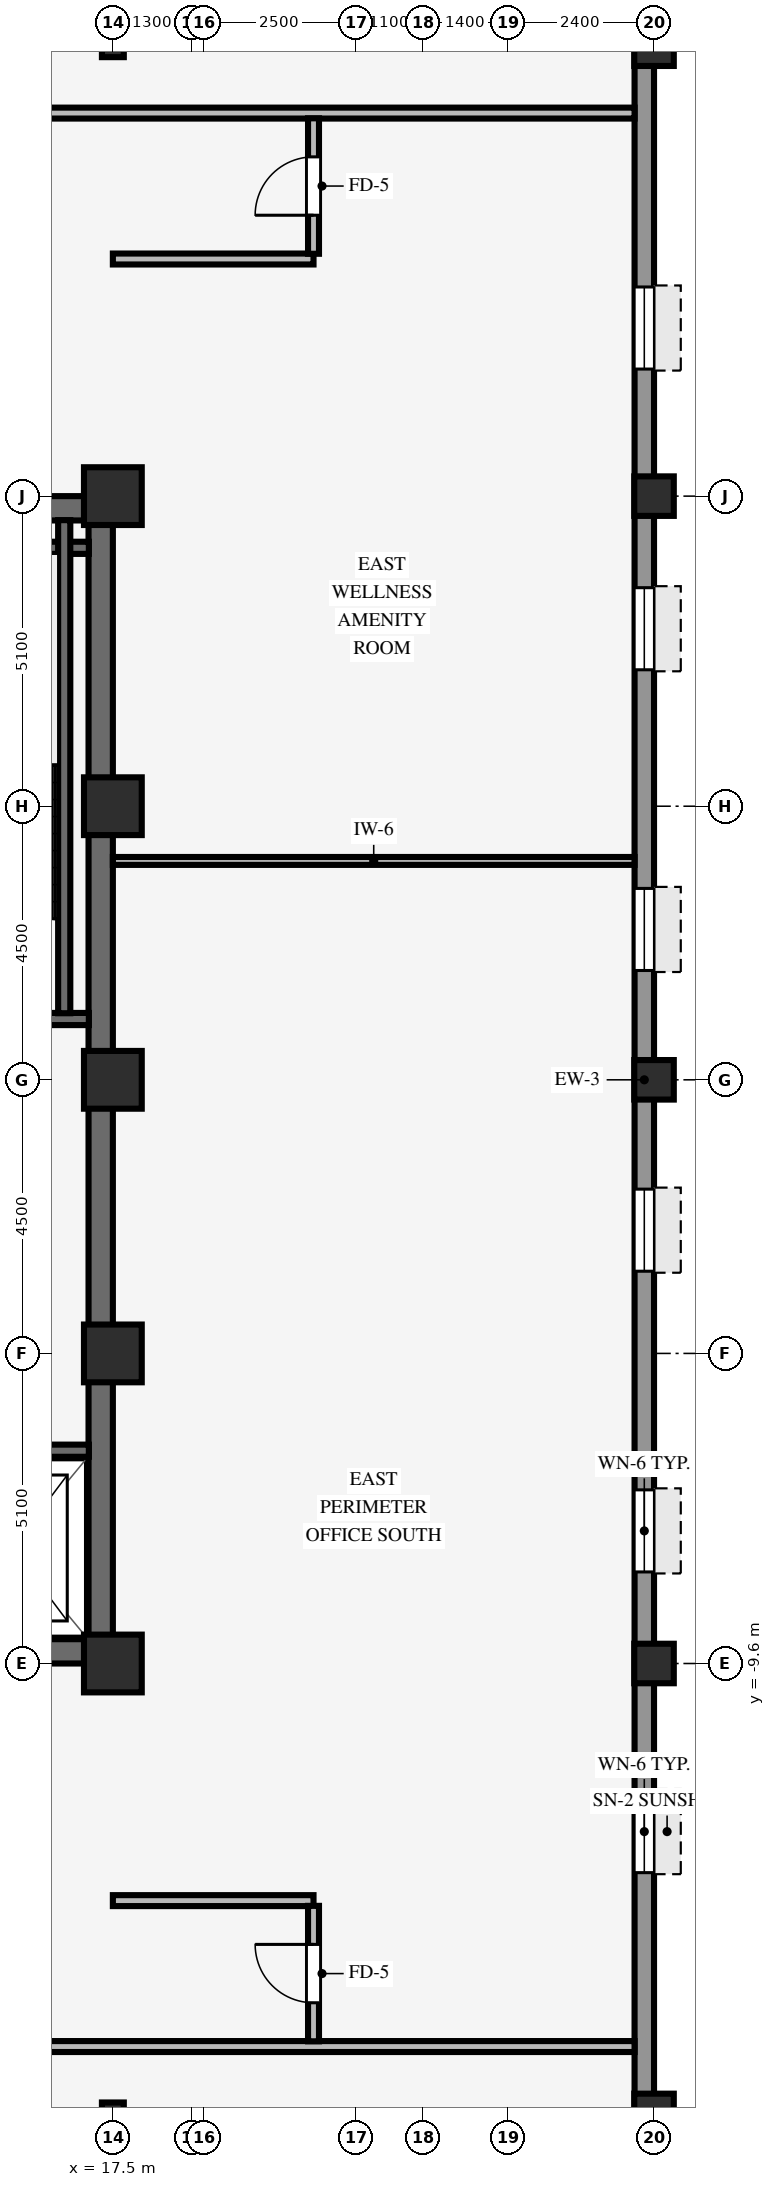
"""IFC4 building model, lengths in metres.
Left out: names, types, materials, properties, quantities, classifications, styles, units other than length and angle.
Written with IfcOpenShell. Run it as: python <this file> out.ifc"""

import sys

from ifc_helpers import new_model, si_unit, direction, frame, frame_2d, origin, origin_2d, place, context, subcontext, project, spatial, rectangle, hollow_rectangle, i_section, extrude, source, transform, mapped, element, fill, save


model = new_model("IFC4")
c1 = context("Model", 3, precision=1e-05, world=origin(), true_north=direction((0.0, 1.0)))
c2 = subcontext(c1, "Body", "Model", "MODEL_VIEW")
j1 = project(units=[si_unit("LENGTHUNIT", "METRE"), si_unit("PLANEANGLEUNIT", "RADIAN")], contexts=[c1])
p1 = place(None, origin())
s1 = spatial("IfcSite", under=j1, at=p1, CompositionType="ELEMENT")
p2 = place(p1, origin())
s2 = spatial("IfcBuilding", under=s1, at=p2, CompositionType="ELEMENT")
p3 = place(p2, frame((0.0, 0.0, 138.45)))
s3 = spatial("IfcBuildingStorey", under=s2, at=p3, CompositionType="ELEMENT", Elevation=138.45)
for number, where, z_axis, x_axis in (
    (1, (9.0, -9.4, 0.0), (0.0, 0.0, 1.0), (1.0, 0.0, 0.0)),
    (2, (9.0, 9.4, 0.0), (0.0, 0.0, 1.0), (1.0, 0.0, 0.0)),
):
    element("IfcWall", number, at=place(p3, frame(where, z_axis=z_axis, x_axis=x_axis)), inside=s3, PredefinedType="SHEAR", context=c2, shape_type="SweptSolid", body=[
        extrude(rectangle(XDim=8.5, YDim=0.4, at=frame_2d((4.25, 0.0))), origin(), (0.0, 0.0, 1.0), 3.37),
    ])
p4 = place(p3, frame((17.3, -9.205, 0.0), z_axis=(0.0, 0.0, 1.0), x_axis=(0.0, 1.0, 0.0)))
e3 = element("IfcWall", 3, at=p4, inside=s3, PredefinedType="SHEAR", context=c2, shape_type="SweptSolid", body=[
    extrude(rectangle(XDim=18.41, YDim=0.4, at=frame_2d((9.205, 0.0))), origin(), (0.0, 0.0, 1.0), 3.37),
])
for number, where, z_axis, x_axis in (
    (4, (17.5, -9.6, 0.0), (0.0, 0.0, 1.0), (1.0, 0.0, 0.0)),
    (5, (17.5, -4.5, 0.0), (0.0, 0.0, 1.0), (1.0, 0.0, 0.0)),
    (6, (17.5, 4.5, 0.0), (0.0, 0.0, 1.0), (1.0, 0.0, 0.0)),
    (7, (17.5, 9.6, 0.0), (0.0, 0.0, 1.0), (1.0, 0.0, 0.0)),
    (8, (17.5, 0.0, 0.0), (0.0, 0.0, 1.0), (1.0, 0.0, 0.0)),
):
    element("IfcColumn", number, at=place(p3, frame(where, z_axis=z_axis, x_axis=x_axis)), inside=s3, PredefinedType="COLUMN", context=c2, shape_type="SweptSolid", body=[
        extrude(rectangle(XDim=0.95, YDim=0.95, at=origin_2d()), origin(), (0.0, 0.0, 1.0), 3.37),
    ])
for number, where, z_axis, x_axis in (
    (9, (26.4, -17.0, 0.0), (0.0, 0.0, 1.0), (1.0, 0.0, 0.0)),
    (10, (26.4, -9.6, 0.0), (0.0, 0.0, 1.0), (1.0, 0.0, 0.0)),
    (11, (26.4, 0.0, 0.0), (0.0, 0.0, 1.0), (1.0, 0.0, 0.0)),
    (12, (26.4, 9.6, 0.0), (0.0, 0.0, 1.0), (1.0, 0.0, 0.0)),
    (13, (26.4, 17.0, 0.0), (0.0, 0.0, 1.0), (1.0, 0.0, 0.0)),
):
    element("IfcColumn", number, at=place(p3, frame(where, z_axis=z_axis, x_axis=x_axis)), inside=s3, PredefinedType="COLUMN", context=c2, shape_type="SweptSolid", body=[
        extrude(hollow_rectangle(XDim=0.65, YDim=0.65, WallThickness=0.04, InnerFilletRadius=0.04, OuterFilletRadius=0.08, at=origin_2d()), origin(), (0.0, 0.0, 1.0), 3.37),
    ])
for number, where, z_axis, x_axis in (
    (14, (17.5, -17.0, 0.0), (0.0, 0.0, 1.0), (1.0, 0.0, 0.0)),
    (15, (17.5, 17.0, 0.0), (0.0, 0.0, 1.0), (1.0, 0.0, 0.0)),
):
    element("IfcColumn", number, at=place(p3, frame(where, z_axis=z_axis, x_axis=x_axis)), inside=s3, PredefinedType="COLUMN", context=c2, shape_type="SweptSolid", body=[
        extrude(i_section(OverallWidth=0.36, OverallDepth=0.36, WebThickness=0.021, FlangeThickness=0.021, FilletRadius=0.018, at=origin_2d()), origin(), (0.0, 0.0, 1.0), 3.37),
    ])
p5 = place(p3, frame((26.24, -20.784, 0.0), z_axis=(0.0, 0.0, 1.0), x_axis=(0.0, 1.0, 0.0)))
e16 = element("IfcWall", 16, at=p5, inside=s3, PredefinedType="STANDARD", context=c2, shape_type="SweptSolid", body=[
    extrude(rectangle(XDim=41.568, YDim=0.32, at=frame_2d((20.784, 0.0))), origin(), (0.0, 0.0, 1.0), 2.705),
])
p6 = place(p5, frame((1.448, 0.0, 0.8)))
e17 = element("IfcOpeningElement", 17, at=p6, cuts=e16, PredefinedType="OPENING", context=c2, shape_type="SweptSolid", body=[
    extrude(rectangle(XDim=1.35, YDim=1.56, at=frame_2d((0.675, 0.78))), frame((0.0, 0.17, 0.0), z_axis=(0.0, -1.0, 0.0), x_axis=(1.0, 0.0, 0.0)), (0.0, 0.0, 1.0), 0.34),
])
p7 = place(p5, frame((7.744, 0.0, 0.8)))
e18 = element("IfcOpeningElement", 18, at=p7, cuts=e16, PredefinedType="OPENING", context=c2, shape_type="SweptSolid", body=[
    extrude(rectangle(XDim=1.35, YDim=1.56, at=frame_2d((0.675, 0.78))), frame((0.0, 0.17, 0.0), z_axis=(0.0, -1.0, 0.0), x_axis=(1.0, 0.0, 0.0)), (0.0, 0.0, 1.0), 0.34),
])
p8 = place(p5, frame((12.69, 0.0, 0.8)))
e19 = element("IfcOpeningElement", 19, at=p8, cuts=e16, PredefinedType="OPENING", context=c2, shape_type="SweptSolid", body=[
    extrude(rectangle(XDim=1.35, YDim=1.56, at=frame_2d((0.675, 0.78))), frame((0.0, 0.17, 0.0), z_axis=(0.0, -1.0, 0.0), x_axis=(1.0, 0.0, 0.0)), (0.0, 0.0, 1.0), 0.34),
])
p9 = place(p5, frame((17.636, 0.0, 0.8)))
e20 = element("IfcOpeningElement", 20, at=p9, cuts=e16, PredefinedType="OPENING", context=c2, shape_type="SweptSolid", body=[
    extrude(rectangle(XDim=1.35, YDim=1.56, at=frame_2d((0.675, 0.78))), frame((0.0, 0.17, 0.0), z_axis=(0.0, -1.0, 0.0), x_axis=(1.0, 0.0, 0.0)), (0.0, 0.0, 1.0), 0.34),
])
p10 = place(p5, frame((22.582, 0.0, 0.8)))
e21 = element("IfcOpeningElement", 21, at=p10, cuts=e16, PredefinedType="OPENING", context=c2, shape_type="SweptSolid", body=[
    extrude(rectangle(XDim=1.35, YDim=1.56, at=frame_2d((0.675, 0.78))), frame((0.0, 0.17, 0.0), z_axis=(0.0, -1.0, 0.0), x_axis=(1.0, 0.0, 0.0)), (0.0, 0.0, 1.0), 0.34),
])
p11 = place(p5, frame((27.528, 0.0, 0.8)))
e22 = element("IfcOpeningElement", 22, at=p11, cuts=e16, PredefinedType="OPENING", context=c2, shape_type="SweptSolid", body=[
    extrude(rectangle(XDim=1.35, YDim=1.56, at=frame_2d((0.675, 0.78))), frame((0.0, 0.17, 0.0), z_axis=(0.0, -1.0, 0.0), x_axis=(1.0, 0.0, 0.0)), (0.0, 0.0, 1.0), 0.34),
])
p12 = place(p5, frame((32.474, 0.0, 0.8)))
e23 = element("IfcOpeningElement", 23, at=p12, cuts=e16, PredefinedType="OPENING", context=c2, shape_type="SweptSolid", body=[
    extrude(rectangle(XDim=1.35, YDim=1.56, at=frame_2d((0.675, 0.78))), frame((0.0, 0.17, 0.0), z_axis=(0.0, -1.0, 0.0), x_axis=(1.0, 0.0, 0.0)), (0.0, 0.0, 1.0), 0.34),
])
p13 = place(p5, frame((38.77, 0.0, 0.8)))
e24 = element("IfcOpeningElement", 24, at=p13, cuts=e16, PredefinedType="OPENING", context=c2, shape_type="SweptSolid", body=[
    extrude(rectangle(XDim=1.35, YDim=1.56, at=frame_2d((0.675, 0.78))), frame((0.0, 0.17, 0.0), z_axis=(0.0, -1.0, 0.0), x_axis=(1.0, 0.0, 0.0)), (0.0, 0.0, 1.0), 0.34),
])
for number, where, z_axis, x_axis in (
    (25, (13.535, 1.0, 0.0), (0.0, 0.0, 1.0), (1.0, 0.0, 0.0)),
    (26, (13.535, 8.75, 0.0), (0.0, 0.0, 1.0), (1.0, 0.0, 0.0)),
):
    element("IfcWall", number, at=place(p3, frame(where, z_axis=z_axis, x_axis=x_axis)), inside=s3, PredefinedType="SHEAR", context=c2, shape_type="SweptSolid", body=[
        extrude(rectangle(XDim=3.57, YDim=0.2, at=frame_2d((1.785, 0.0))), origin(), (0.0, 0.0, 1.0), 3.37),
    ])
p14 = place(p3, frame((16.7, 1.095, 0.0), z_axis=(0.0, 0.0, 1.0), x_axis=(0.0, 1.0, 0.0)))
e27 = element("IfcWall", 27, at=p14, inside=s3, PredefinedType="SHEAR", context=c2, shape_type="SweptSolid", body=[
    extrude(rectangle(XDim=8.11, YDim=0.2, at=frame_2d((4.055, 0.0))), origin(), (0.0, 0.0, 1.0), 3.37),
])
p15 = place(p3, frame((14.645, -6.1, 0.0), z_axis=(0.0, 0.0, 1.0), x_axis=(1.0, 0.0, 0.0)))
e28 = element("IfcWall", 28, at=p15, inside=s3, PredefinedType="SHEAR", context=c2, shape_type="SweptSolid", body=[
    extrude(rectangle(XDim=2.46, YDim=0.2, at=frame_2d((1.23, 0.0))), origin(), (0.0, 0.0, 1.0), 3.37),
])
p16 = place(p3, frame((-26.08, -15.9, 0.0), z_axis=(0.0, 0.0, 1.0), x_axis=(1.0, 0.0, 0.0)))
e29 = element("IfcWall", 29, at=p16, inside=s3, PredefinedType="PARTITIONING", context=c2, shape_type="SweptSolid", body=[
    extrude(rectangle(XDim=52.16, YDim=0.18, at=frame_2d((26.08, 0.0))), origin(), (0.0, 0.0, 1.0), 3.36),
])
p17 = place(p16, frame((18.3, 0.0, 0.0)))
e30 = element("IfcOpeningElement", 30, at=p17, cuts=e29, PredefinedType="OPENING", context=c2, shape_type="SweptSolid", body=[
    extrude(rectangle(XDim=0.96, YDim=2.1, at=frame_2d((0.48, 1.05))), frame((0.0, 0.1, 0.0), z_axis=(0.0, -1.0, 0.0), x_axis=(1.0, 0.0, 0.0)), (0.0, 0.0, 1.0), 0.2),
])
p18 = place(p16, frame((40.5, 0.0, 0.0)))
e31 = element("IfcOpeningElement", 31, at=p18, cuts=e29, PredefinedType="OPENING", context=c2, shape_type="SweptSolid", body=[
    extrude(rectangle(XDim=0.96, YDim=2.1, at=frame_2d((0.48, 1.05))), frame((0.0, 0.1, 0.0), z_axis=(0.0, -1.0, 0.0), x_axis=(1.0, 0.0, 0.0)), (0.0, 0.0, 1.0), 0.2),
])
p19 = place(p3, frame((17.5, -13.5, 0.0), z_axis=(0.0, 0.0, 1.0), x_axis=(1.0, 0.0, 0.0)))
e32 = element("IfcWall", 32, at=p19, inside=s3, PredefinedType="PARTITIONING", context=c2, shape_type="SweptSolid", body=[
    extrude(rectangle(XDim=3.3, YDim=0.18, at=frame_2d((1.65, 0.0))), origin(), (0.0, 0.0, 1.0), 2.998),
])
p20 = place(p3, frame((17.5, 3.6, 0.0), z_axis=(0.0, 0.0, 1.0), x_axis=(1.0, 0.0, 0.0)))
e33 = element("IfcWall", 33, at=p20, inside=s3, PredefinedType="PARTITIONING", context=c2, shape_type="SweptSolid", body=[
    extrude(rectangle(XDim=8.58, YDim=0.13, at=frame_2d((4.29, 0.0))), origin(), (0.0, 0.0, 1.0), 3.36),
])
p21 = place(p3, frame((17.5, 13.5, 0.0), z_axis=(0.0, 0.0, 1.0), x_axis=(1.0, 0.0, 0.0)))
e34 = element("IfcWall", 34, at=p21, inside=s3, PredefinedType="PARTITIONING", context=c2, shape_type="SweptSolid", body=[
    extrude(rectangle(XDim=3.3, YDim=0.18, at=frame_2d((1.65, 0.0))), origin(), (0.0, 0.0, 1.0), 2.998),
])
p22 = place(p3, frame((-26.08, 15.9, 0.0), z_axis=(0.0, 0.0, 1.0), x_axis=(1.0, 0.0, 0.0)))
e35 = element("IfcWall", 35, at=p22, inside=s3, PredefinedType="PARTITIONING", context=c2, shape_type="SweptSolid", body=[
    extrude(rectangle(XDim=52.16, YDim=0.18, at=frame_2d((26.08, 0.0))), origin(), (0.0, 0.0, 1.0), 3.36),
])
p23 = place(p22, frame((15.55, 0.0, 0.0)))
e36 = element("IfcOpeningElement", 36, at=p23, cuts=e35, PredefinedType="OPENING", context=c2, shape_type="SweptSolid", body=[
    extrude(rectangle(XDim=0.96, YDim=2.1, at=frame_2d((0.48, 1.05))), frame((0.0, 0.1, 0.0), z_axis=(0.0, -1.0, 0.0), x_axis=(1.0, 0.0, 0.0)), (0.0, 0.0, 1.0), 0.2),
])
p24 = place(p22, frame((40.5, 0.0, 0.0)))
e37 = element("IfcOpeningElement", 37, at=p24, cuts=e35, PredefinedType="OPENING", context=c2, shape_type="SweptSolid", body=[
    extrude(rectangle(XDim=0.96, YDim=2.1, at=frame_2d((0.48, 1.05))), frame((0.0, 0.1, 0.0), z_axis=(0.0, -1.0, 0.0), x_axis=(1.0, 0.0, 0.0)), (0.0, 0.0, 1.0), 0.2),
])
p25 = place(p22, frame((6.65, 0.0, 0.0)))
e38 = element("IfcOpeningElement", 38, at=p25, cuts=e35, PredefinedType="OPENING", context=c2, shape_type="SweptSolid", body=[
    extrude(rectangle(XDim=0.96, YDim=2.1, at=frame_2d((0.48, 1.05))), frame((0.0, 0.1, 0.0), z_axis=(0.0, -1.0, 0.0), x_axis=(1.0, 0.0, 0.0)), (0.0, 0.0, 1.0), 0.2),
])
p26 = place(p3, frame((20.8, -15.814, 0.0), z_axis=(0.0, 0.0, 1.0), x_axis=(0.0, 1.0, 0.0)))
e39 = element("IfcWall", 39, at=p26, inside=s3, PredefinedType="PARTITIONING", context=c2, shape_type="SweptSolid", body=[
    extrude(rectangle(XDim=2.228, YDim=0.18, at=frame_2d((1.114, 0.0))), origin(), (0.0, 0.0, 1.0), 3.36),
])
p27 = place(p26, frame((0.634, 0.0, 0.0)))
e40 = element("IfcOpeningElement", 40, at=p27, cuts=e39, PredefinedType="OPENING", context=c2, shape_type="SweptSolid", body=[
    extrude(rectangle(XDim=0.96, YDim=2.1, at=frame_2d((0.48, 1.05))), frame((0.0, 0.1, 0.0), z_axis=(0.0, -1.0, 0.0), x_axis=(1.0, 0.0, 0.0)), (0.0, 0.0, 1.0), 0.2),
])
p28 = place(p3, frame((20.8, 13.586, 0.0), z_axis=(0.0, 0.0, 1.0), x_axis=(0.0, 1.0, 0.0)))
e41 = element("IfcWall", 41, at=p28, inside=s3, PredefinedType="PARTITIONING", context=c2, shape_type="SweptSolid", body=[
    extrude(rectangle(XDim=2.228, YDim=0.18, at=frame_2d((1.114, 0.0))), origin(), (0.0, 0.0, 1.0), 3.36),
])
p29 = place(p28, frame((0.634, 0.0, 0.0)))
e42 = element("IfcOpeningElement", 42, at=p29, cuts=e41, PredefinedType="OPENING", context=c2, shape_type="SweptSolid", body=[
    extrude(rectangle(XDim=0.96, YDim=2.1, at=frame_2d((0.48, 1.05))), frame((0.0, 0.1, 0.0), z_axis=(0.0, -1.0, 0.0), x_axis=(1.0, 0.0, 0.0)), (0.0, 0.0, 1.0), 0.2),
])
m1 = source(origin(), c2, "Body", "SweptSolid", [
    extrude(rectangle(XDim=1.35, YDim=1.56, at=frame_2d((0.675, 0.78))), frame((0.0, 0.03, 0.0), z_axis=(0.0, -1.0, 0.0), x_axis=(1.0, 0.0, 0.0)), (0.0, 0.0, 1.0), 0.06),
])
p30 = place(p7, origin())
e43 = element("IfcWindow", 43, at=p30, inside=s3, PartitioningType="SINGLE_PANEL", PredefinedType="WINDOW", context=c2, shape_type="MappedRepresentation", body=[
    mapped(m1, transform((0.0, 0.0, 0.0), scale=1.0)),
])
fill(e18, e43)
p31 = place(p8, origin())
e44 = element("IfcWindow", 44, at=p31, inside=s3, PartitioningType="SINGLE_PANEL", PredefinedType="WINDOW", context=c2, shape_type="MappedRepresentation", body=[
    mapped(m1, transform((0.0, 0.0, 0.0), scale=1.0)),
])
fill(e19, e44)
p32 = place(p9, origin())
e45 = element("IfcWindow", 45, at=p32, inside=s3, PartitioningType="SINGLE_PANEL", PredefinedType="WINDOW", context=c2, shape_type="MappedRepresentation", body=[
    mapped(m1, transform((0.0, 0.0, 0.0), scale=1.0)),
])
fill(e20, e45)
p33 = place(p10, origin())
e46 = element("IfcWindow", 46, at=p33, inside=s3, PartitioningType="SINGLE_PANEL", PredefinedType="WINDOW", context=c2, shape_type="MappedRepresentation", body=[
    mapped(m1, transform((0.0, 0.0, 0.0), scale=1.0)),
])
fill(e21, e46)
p34 = place(p11, origin())
e47 = element("IfcWindow", 47, at=p34, inside=s3, PartitioningType="SINGLE_PANEL", PredefinedType="WINDOW", context=c2, shape_type="MappedRepresentation", body=[
    mapped(m1, transform((0.0, 0.0, 0.0), scale=1.0)),
])
fill(e22, e47)
p35 = place(p12, origin())
e48 = element("IfcWindow", 48, at=p35, inside=s3, PartitioningType="SINGLE_PANEL", PredefinedType="WINDOW", context=c2, shape_type="MappedRepresentation", body=[
    mapped(m1, transform((0.0, 0.0, 0.0), scale=1.0)),
])
fill(e23, e48)
m2 = source(origin(), c2, "Body", "SweptSolid", [
    extrude(rectangle(XDim=0.96, YDim=2.1, at=frame_2d((0.48, 1.05))), frame((0.0, 0.025, 0.0), z_axis=(0.0, -1.0, 0.0), x_axis=(1.0, 0.0, 0.0)), (0.0, 0.0, 1.0), 0.05),
])
p36 = place(p27, origin())
e49 = element("IfcDoor", 49, at=p36, inside=s3, OperationType="SINGLE_SWING_RIGHT", PredefinedType="DOOR", context=c2, shape_type="MappedRepresentation", body=[
    mapped(m2, transform((0.0, 0.0, 0.0), scale=1.0)),
])
fill(e40, e49)
p37 = place(p29, origin())
e50 = element("IfcDoor", 50, at=p37, inside=s3, OperationType="SINGLE_SWING_LEFT", PredefinedType="DOOR", context=c2, shape_type="MappedRepresentation", body=[
    mapped(m2, transform((0.0, 0.0, 0.0), scale=1.0)),
])
fill(e42, e50)
save(model, sys.argv[1])
